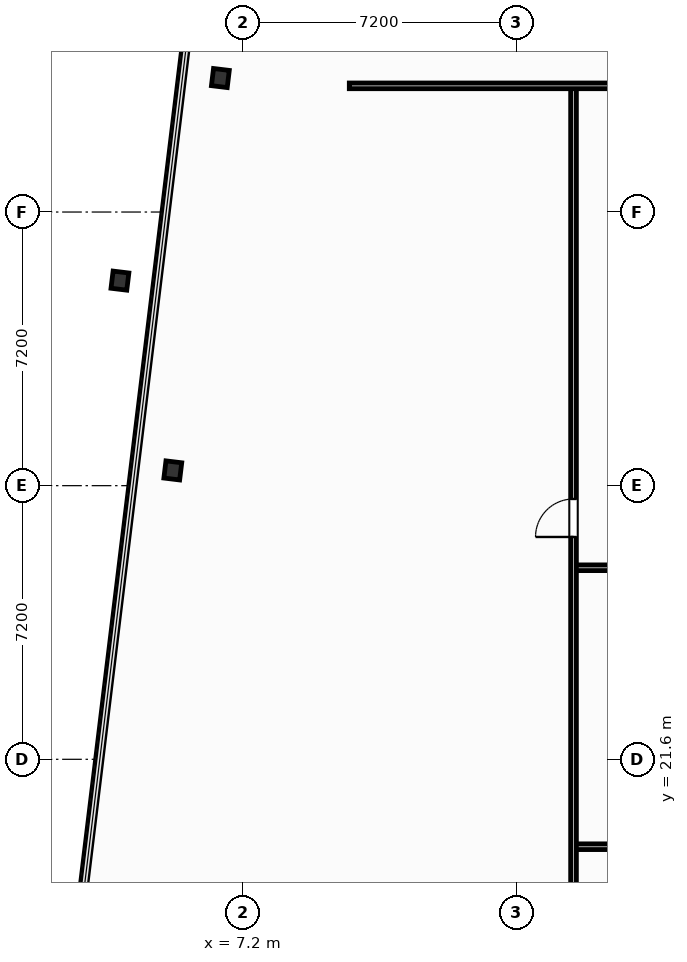
"""IFC4 building model, lengths in metres.
Left out: names, types, materials, properties, quantities, classifications, styles, units other than length and angle.
Written with IfcOpenShell. Run it as: python <this file> out.ifc"""

import sys

from ifc_helpers import new_model, si_unit, direction, frame, frame_2d, origin, origin_2d, place, context, subcontext, project, spatial, rectangle, i_section, extrude, element, fill, save


model = new_model("IFC4")
c1 = context("Model", 3, precision=1e-05, world=origin(), true_north=direction((0.0, 1.0)))
c2 = subcontext(c1, "Body", "Model", "MODEL_VIEW")
j1 = project(units=[si_unit("LENGTHUNIT", "METRE"), si_unit("PLANEANGLEUNIT", "RADIAN")], contexts=[c1])
p1 = place(None, origin())
s1 = spatial("IfcSite", under=j1, at=p1, CompositionType="ELEMENT")
p2 = place(p1, origin())
s2 = spatial("IfcBuilding", under=s1, at=p2, CompositionType="ELEMENT")
p3 = place(p2, frame((0.0, 0.0, 116.9)))
s3 = spatial("IfcBuildingStorey", under=s2, at=p3, CompositionType="ELEMENT", Elevation=116.9)
for number, where, z_axis, x_axis in (
    (1, (6.607, 39.526, -0.32), (0.0, 0.0, 1.0), (0.993, -0.12, 0.0)),
    (2, (3.964, 34.195, -0.32), (0.0, 0.0, 1.0), (0.993, -0.12, 0.0)),
    (3, (5.355, 29.201, -0.32), (0.0, 0.0, 1.0), (0.993, -0.12, 0.0)),
):
    element("IfcColumn", number, at=place(p3, frame(where, z_axis=z_axis, x_axis=x_axis)), inside=s3, PredefinedType="COLUMN", context=c2, shape_type="SweptSolid", body=[
        extrude(i_section(OverallWidth=0.418, OverallDepth=0.455, WebThickness=0.042, FlangeThickness=0.068, FilletRadius=0.025, at=origin_2d()), origin(), (0.0, 0.0, 1.0), 5.12),
    ])
p4 = place(p3, frame((15.9, 26.64, 0.0), z_axis=(0.0, 0.0, 1.0), x_axis=(1.0, 0.0, 0.0)))
e4 = element("IfcWall", 4, at=p4, inside=s3, PredefinedType="PARTITIONING", context=c2, shape_type="SweptSolid", body=[
    extrude(rectangle(XDim=8.85, YDim=0.15, at=frame_2d((4.425, 0.0))), origin(), (0.0, 0.0, 1.0), 3.762),
])
p5 = place(p4, frame((2.2, 0.0, 0.0)))
e5 = element("IfcOpeningElement", 5, at=p5, cuts=e4, PredefinedType="OPENING", context=c2, shape_type="SweptSolid", body=[
    extrude(rectangle(XDim=2.0, YDim=2.05, at=frame_2d((1.0, 1.025))), frame((0.0, 0.085, 0.0), z_axis=(0.0, -1.0, 0.0), x_axis=(1.0, 0.0, 0.0)), (0.0, 0.0, 1.0), 0.17),
])
p6 = place(p3, frame((15.9, 19.3, 0.0), z_axis=(0.0, 0.0, 1.0), x_axis=(1.0, 0.0, 0.0)))
e6 = element("IfcWall", 6, at=p6, inside=s3, PredefinedType="PARTITIONING", context=c2, shape_type="SweptSolid", body=[
    extrude(rectangle(XDim=8.85, YDim=0.15, at=frame_2d((4.425, 0.0))), origin(), (0.0, 0.0, 1.0), 4.55),
])
p7 = place(p3, frame((15.9, 6.91, 0.0), z_axis=(0.0, 0.0, 1.0), x_axis=(0.0, 1.0, 0.0)))
e7 = element("IfcWall", 7, at=p7, inside=s3, PredefinedType="PARTITIONING", context=c2, shape_type="SweptSolid", body=[
    extrude(rectangle(XDim=32.41, YDim=0.15, at=frame_2d((16.205, 0.0))), origin(), (0.0, 0.0, 1.0), 4.55),
])
p8 = place(p7, frame((20.54, 0.0, 0.0)))
e8 = element("IfcOpeningElement", 8, at=p8, cuts=e7, PredefinedType="OPENING", context=c2, shape_type="SweptSolid", body=[
    extrude(rectangle(XDim=1.0, YDim=2.05, at=frame_2d((0.5, 1.025))), frame((0.0, 0.085, 0.0), z_axis=(0.0, -1.0, 0.0), x_axis=(1.0, 0.0, 0.0)), (0.0, 0.0, 1.0), 0.17),
])
p9 = place(p3, frame((10.0, 39.32, 0.0), z_axis=(0.0, 0.0, 1.0), x_axis=(1.0, 0.0, 0.0)))
e9 = element("IfcWall", 9, at=p9, inside=s3, PredefinedType="PARTITIONING", context=c2, shape_type="SweptSolid", body=[
    extrude(rectangle(XDim=62.0, YDim=0.15, at=frame_2d((31.0, 0.0))), origin(), (0.0, 0.0, 1.0), 4.55),
])
p10 = place(p9, frame((15.6, 0.0, 0.0)))
e10 = element("IfcOpeningElement", 10, at=p10, cuts=e9, PredefinedType="OPENING", context=c2, shape_type="SweptSolid", body=[
    extrude(rectangle(XDim=1.0, YDim=2.05, at=frame_2d((0.5, 1.025))), frame((0.0, 0.085, 0.0), z_axis=(0.0, -1.0, 0.0), x_axis=(1.0, 0.0, 0.0)), (0.0, 0.0, 1.0), 0.17),
])
p11 = place(p9, frame((39.5, 0.0, 0.0)))
e11 = element("IfcOpeningElement", 11, at=p11, cuts=e9, PredefinedType="OPENING", context=c2, shape_type="SweptSolid", body=[
    extrude(rectangle(XDim=2.0, YDim=2.05, at=frame_2d((1.0, 1.025))), frame((0.0, 0.085, 0.0), z_axis=(0.0, -1.0, 0.0), x_axis=(1.0, 0.0, 0.0)), (0.0, 0.0, 1.0), 0.17),
])
p12 = place(p8, origin())
e12 = element("IfcDoor", 12, at=p12, inside=s3, OperationType="SINGLE_SWING_LEFT", PredefinedType="DOOR", context=c2, shape_type="SweptSolid", body=[
    extrude(rectangle(XDim=1.0, YDim=2.05, at=frame_2d((0.5, 1.025))), frame((0.0, 0.025, 0.0), z_axis=(0.0, -1.0, 0.0), x_axis=(1.0, 0.0, 0.0)), (0.0, 0.0, 1.0), 0.05),
])
fill(e8, e12)
save(model, sys.argv[1])
